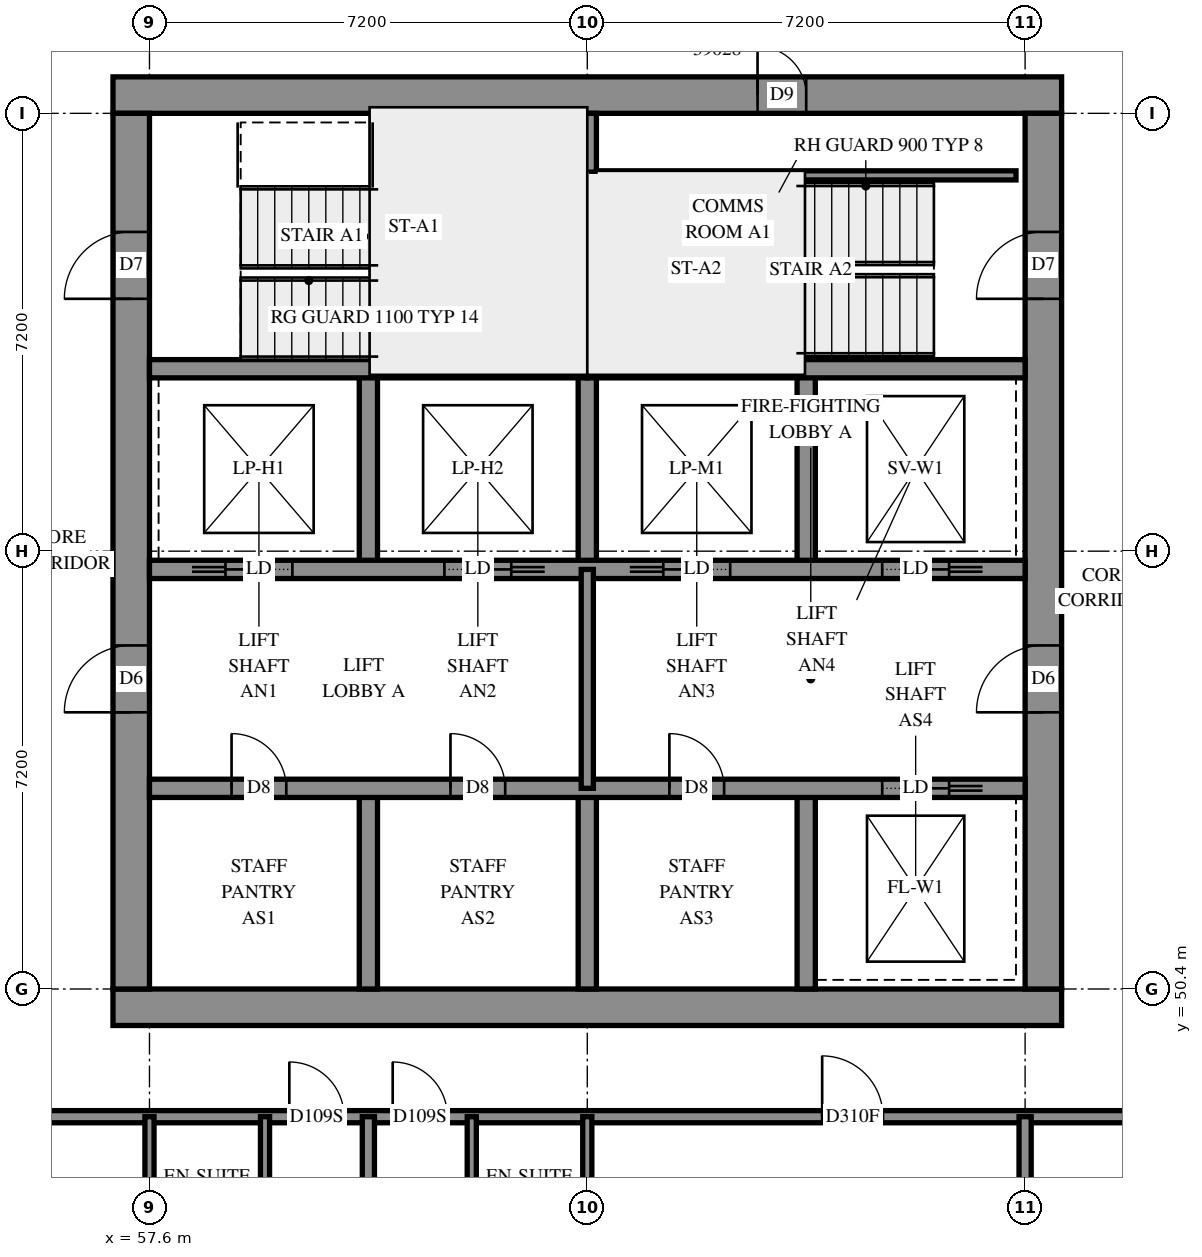
"""IFC4 building model, lengths in metres.
Left out: names, types, materials, properties, quantities, classifications, styles, units other than length and angle.
Written with IfcOpenShell. Run it as: python <this file> out.ifc"""

import sys

from ifc_helpers import new_model, si_unit, direction, frame, frame_2d, origin, place, context, subcontext, project, spatial, rectangle, extrude, element, fill, save


model = new_model("IFC4")
c1 = context("Model", 3, precision=1e-05, world=origin(), true_north=direction((0.0, 1.0)))
c2 = subcontext(c1, "Body", "Model", "MODEL_VIEW")
j1 = project(units=[si_unit("LENGTHUNIT", "METRE"), si_unit("PLANEANGLEUNIT", "RADIAN")], contexts=[c1])
p1 = place(None, origin())
s1 = spatial("IfcSite", under=j1, at=p1, CompositionType="ELEMENT")
p2 = place(p1, origin())
s2 = spatial("IfcBuilding", under=s1, at=p2, CompositionType="ELEMENT")
p3 = place(p2, frame((0.0, 0.0, 145.6)))
s3 = spatial("IfcBuildingStorey", under=s2, at=p3, CompositionType="ELEMENT", Elevation=145.6)
p4 = place(p3, frame((57.0, 50.1, -0.3), z_axis=(0.0, 0.0, 1.0), x_axis=(1.0, 0.0, 0.0)))
e1 = element("IfcWall", 1, at=p4, inside=s3, PredefinedType="SHEAR", context=c2, shape_type="SweptSolid", body=[
    extrude(rectangle(XDim=15.6, YDim=0.6, at=frame_2d((7.8, 0.0))), origin(), (0.0, 0.0, 1.0), 2.7),
])
p5 = place(p3, frame((57.0, 65.1, -0.3), z_axis=(0.0, 0.0, 1.0), x_axis=(1.0, 0.0, 0.0)))
e2 = element("IfcWall", 2, at=p5, inside=s3, PredefinedType="SHEAR", context=c2, shape_type="SweptSolid", body=[
    extrude(rectangle(XDim=15.6, YDim=0.6, at=frame_2d((7.8, 0.0))), origin(), (0.0, 0.0, 1.0), 2.7),
])
p6 = place(p5, frame((10.6, 0.0, 0.3)))
e3 = element("IfcOpeningElement", 3, at=p6, cuts=e2, PredefinedType="OPENING", context=c2, shape_type="SweptSolid", body=[
    extrude(rectangle(XDim=0.8, YDim=2.1, at=frame_2d((0.4, 1.05))), frame((0.0, 0.31, 0.0), z_axis=(0.0, -1.0, 0.0), x_axis=(1.0, 0.0, 0.0)), (0.0, 0.0, 1.0), 0.62),
])
p7 = place(p3, frame((57.3, 50.4, -0.3), z_axis=(0.0, 0.0, 1.0), x_axis=(0.0, 1.0, 0.0)))
e4 = element("IfcWall", 4, at=p7, inside=s3, PredefinedType="SHEAR", context=c2, shape_type="SweptSolid", body=[
    extrude(rectangle(XDim=14.4, YDim=0.6, at=frame_2d((7.2, 0.0))), origin(), (0.0, 0.0, 1.0), 2.7),
])
p8 = place(p7, frame((4.55, 0.0, 0.3)))
e5 = element("IfcOpeningElement", 5, at=p8, cuts=e4, PredefinedType="OPENING", context=c2, shape_type="SweptSolid", body=[
    extrude(rectangle(XDim=1.1, YDim=2.1, at=frame_2d((0.55, 1.05))), frame((0.0, 0.31, 0.0), z_axis=(0.0, -1.0, 0.0), x_axis=(1.0, 0.0, 0.0)), (0.0, 0.0, 1.0), 0.62),
])
p9 = place(p7, frame((11.35, 0.0, 0.3)))
e6 = element("IfcOpeningElement", 6, at=p9, cuts=e4, PredefinedType="OPENING", context=c2, shape_type="SweptSolid", body=[
    extrude(rectangle(XDim=1.1, YDim=2.1, at=frame_2d((0.55, 1.05))), frame((0.0, 0.31, 0.0), z_axis=(0.0, -1.0, 0.0), x_axis=(1.0, 0.0, 0.0)), (0.0, 0.0, 1.0), 0.62),
])
p10 = place(p3, frame((72.3, 50.4, -0.3), z_axis=(0.0, 0.0, 1.0), x_axis=(0.0, 1.0, 0.0)))
e7 = element("IfcWall", 7, at=p10, inside=s3, PredefinedType="SHEAR", context=c2, shape_type="SweptSolid", body=[
    extrude(rectangle(XDim=14.4, YDim=0.6, at=frame_2d((7.2, 0.0))), origin(), (0.0, 0.0, 1.0), 2.7),
])
p11 = place(p10, frame((4.55, 0.0, 0.3)))
e8 = element("IfcOpeningElement", 8, at=p11, cuts=e7, PredefinedType="OPENING", context=c2, shape_type="SweptSolid", body=[
    extrude(rectangle(XDim=1.1, YDim=2.1, at=frame_2d((0.55, 1.05))), frame((0.0, 0.31, 0.0), z_axis=(0.0, -1.0, 0.0), x_axis=(1.0, 0.0, 0.0)), (0.0, 0.0, 1.0), 0.62),
])
p12 = place(p10, frame((11.35, 0.0, 0.3)))
e9 = element("IfcOpeningElement", 9, at=p12, cuts=e7, PredefinedType="OPENING", context=c2, shape_type="SweptSolid", body=[
    extrude(rectangle(XDim=1.1, YDim=2.1, at=frame_2d((0.55, 1.05))), frame((0.0, 0.31, 0.0), z_axis=(0.0, -1.0, 0.0), x_axis=(1.0, 0.0, 0.0)), (0.0, 0.0, 1.0), 0.62),
])
for number, where, z_axis, x_axis in (
    (10, (61.2, 50.4, 0.0), (0.0, 0.0, 1.0), (0.0, 1.0, 0.0)),
    (11, (61.2, 57.3, 0.0), (0.0, 0.0, 1.0), (0.0, 1.0, 0.0)),
    (12, (64.8, 50.4, 0.0), (0.0, 0.0, 1.0), (0.0, 1.0, 0.0)),
    (13, (64.8, 57.3, 0.0), (0.0, 0.0, 1.0), (0.0, 1.0, 0.0)),
    (14, (68.4, 50.4, 0.0), (0.0, 0.0, 1.0), (0.0, 1.0, 0.0)),
    (15, (68.4, 57.3, 0.0), (0.0, 0.0, 1.0), (0.0, 1.0, 0.0)),
):
    element("IfcWall", number, at=place(p3, frame(where, z_axis=z_axis, x_axis=x_axis)), inside=s3, PredefinedType="SOLIDWALL", context=c2, shape_type="SweptSolid", body=[
        extrude(rectangle(XDim=3.3, YDim=0.3, at=frame_2d((1.65, 0.0))), origin(), (0.0, 0.0, 1.0), 3.1),
    ])
p13 = place(p3, frame((57.6, 53.7, 0.0), z_axis=(0.0, 0.0, 1.0), x_axis=(1.0, 0.0, 0.0)))
e16 = element("IfcWall", 16, at=p13, inside=s3, PredefinedType="SOLIDWALL", context=c2, shape_type="SweptSolid", body=[
    extrude(rectangle(XDim=14.4, YDim=0.3, at=frame_2d((7.2, 0.0))), origin(), (0.0, 0.0, 1.0), 3.1),
])
p14 = place(p13, frame((1.35, 0.0, 0.0)))
e17 = element("IfcOpeningElement", 17, at=p14, cuts=e16, PredefinedType="OPENING", context=c2, shape_type="SweptSolid", body=[
    extrude(rectangle(XDim=0.9, YDim=2.1, at=frame_2d((0.45, 1.05))), frame((0.0, 0.16, 0.0), z_axis=(0.0, -1.0, 0.0), x_axis=(1.0, 0.0, 0.0)), (0.0, 0.0, 1.0), 0.32),
])
p15 = place(p13, frame((4.95, 0.0, 0.0)))
e18 = element("IfcOpeningElement", 18, at=p15, cuts=e16, PredefinedType="OPENING", context=c2, shape_type="SweptSolid", body=[
    extrude(rectangle(XDim=0.9, YDim=2.1, at=frame_2d((0.45, 1.05))), frame((0.0, 0.16, 0.0), z_axis=(0.0, -1.0, 0.0), x_axis=(1.0, 0.0, 0.0)), (0.0, 0.0, 1.0), 0.32),
])
p16 = place(p13, frame((8.55, 0.0, 0.0)))
e19 = element("IfcOpeningElement", 19, at=p16, cuts=e16, PredefinedType="OPENING", context=c2, shape_type="SweptSolid", body=[
    extrude(rectangle(XDim=0.9, YDim=2.1, at=frame_2d((0.45, 1.05))), frame((0.0, 0.16, 0.0), z_axis=(0.0, -1.0, 0.0), x_axis=(1.0, 0.0, 0.0)), (0.0, 0.0, 1.0), 0.32),
])
p17 = place(p13, frame((12.05, 0.0, 0.0)))
e20 = element("IfcOpeningElement", 20, at=p17, cuts=e16, PredefinedType="OPENING", context=c2, shape_type="SweptSolid", body=[
    extrude(rectangle(XDim=1.1, YDim=2.1, at=frame_2d((0.55, 1.05))), frame((0.0, 0.16, 0.0), z_axis=(0.0, -1.0, 0.0), x_axis=(1.0, 0.0, 0.0)), (0.0, 0.0, 1.0), 0.32),
])
p18 = place(p3, frame((57.6, 57.3, 0.0), z_axis=(0.0, 0.0, 1.0), x_axis=(1.0, 0.0, 0.0)))
e21 = element("IfcWall", 21, at=p18, inside=s3, PredefinedType="SOLIDWALL", context=c2, shape_type="SweptSolid", body=[
    extrude(rectangle(XDim=14.4, YDim=0.3, at=frame_2d((7.2, 0.0))), origin(), (0.0, 0.0, 1.0), 3.1),
])
p19 = place(p18, frame((1.25, 0.0, 0.0)))
e22 = element("IfcOpeningElement", 22, at=p19, cuts=e21, PredefinedType="OPENING", context=c2, shape_type="SweptSolid", body=[
    extrude(rectangle(XDim=1.1, YDim=2.1, at=frame_2d((0.55, 1.05))), frame((0.0, 0.16, 0.0), z_axis=(0.0, -1.0, 0.0), x_axis=(1.0, 0.0, 0.0)), (0.0, 0.0, 1.0), 0.32),
])
p20 = place(p18, frame((4.85, 0.0, 0.0)))
e23 = element("IfcOpeningElement", 23, at=p20, cuts=e21, PredefinedType="OPENING", context=c2, shape_type="SweptSolid", body=[
    extrude(rectangle(XDim=1.1, YDim=2.1, at=frame_2d((0.55, 1.05))), frame((0.0, 0.16, 0.0), z_axis=(0.0, -1.0, 0.0), x_axis=(1.0, 0.0, 0.0)), (0.0, 0.0, 1.0), 0.32),
])
p21 = place(p18, frame((8.45, 0.0, 0.0)))
e24 = element("IfcOpeningElement", 24, at=p21, cuts=e21, PredefinedType="OPENING", context=c2, shape_type="SweptSolid", body=[
    extrude(rectangle(XDim=1.1, YDim=2.1, at=frame_2d((0.55, 1.05))), frame((0.0, 0.16, 0.0), z_axis=(0.0, -1.0, 0.0), x_axis=(1.0, 0.0, 0.0)), (0.0, 0.0, 1.0), 0.32),
])
p22 = place(p18, frame((12.05, 0.0, 0.0)))
e25 = element("IfcOpeningElement", 25, at=p22, cuts=e21, PredefinedType="OPENING", context=c2, shape_type="SweptSolid", body=[
    extrude(rectangle(XDim=1.1, YDim=2.1, at=frame_2d((0.55, 1.05))), frame((0.0, 0.16, 0.0), z_axis=(0.0, -1.0, 0.0), x_axis=(1.0, 0.0, 0.0)), (0.0, 0.0, 1.0), 0.32),
])
for number, where, z_axis, x_axis in (
    (26, (57.6, 60.6, 0.0), (0.0, 0.0, 1.0), (1.0, 0.0, 0.0)),
    (27, (64.8, 60.6, 0.0), (0.0, 0.0, 1.0), (1.0, 0.0, 0.0)),
):
    element("IfcWall", number, at=place(p3, frame(where, z_axis=z_axis, x_axis=x_axis)), inside=s3, PredefinedType="SOLIDWALL", context=c2, shape_type="SweptSolid", body=[
        extrude(rectangle(XDim=7.2, YDim=0.3, at=frame_2d((3.6, 0.0))), origin(), (0.0, 0.0, 1.0), 3.1),
    ])
p23 = place(p3, frame((64.8, 60.6, 0.0), z_axis=(0.0, 0.0, 1.0), x_axis=(0.0, 1.0, 0.0)))
e28 = element("IfcWall", 28, at=p23, inside=s3, PredefinedType="SOLIDWALL", context=c2, shape_type="SweptSolid", body=[
    extrude(rectangle(XDim=4.2, YDim=0.3, at=frame_2d((2.1, 0.0))), origin(), (0.0, 0.0, 1.0), 3.1),
])
p24 = place(p3, frame((64.95, 63.78, 0.0), z_axis=(0.0, 0.0, 1.0), x_axis=(1.0, 0.0, 0.0)))
e29 = element("IfcWall", 29, at=p24, inside=s3, PredefinedType="PARTITIONING", context=c2, shape_type="SweptSolid", body=[
    extrude(rectangle(XDim=6.9, YDim=0.15, at=frame_2d((3.45, 0.0))), origin(), (0.0, 0.0, 1.0), 3.1),
])
p25 = place(p3, frame((64.8, 53.7, 0.0), z_axis=(0.0, 0.0, 1.0), x_axis=(0.0, 1.0, 0.0)))
e30 = element("IfcWall", 30, at=p25, inside=s3, PredefinedType="PARTITIONING", context=c2, shape_type="SweptSolid", body=[
    extrude(rectangle(XDim=3.6, YDim=0.2, at=frame_2d((1.8, 0.0))), origin(), (0.0, 0.0, 1.0), 3.1),
])
p26 = place(p3, frame((55.5, 48.3, 0.0), z_axis=(0.0, 0.0, 1.0), x_axis=(1.0, 0.0, 0.0)))
e31 = element("IfcWall", 31, at=p26, inside=s3, PredefinedType="PARTITIONING", context=c2, shape_type="SweptSolid", body=[
    extrude(rectangle(XDim=18.974, YDim=0.2, at=frame_2d((9.487, 0.0))), origin(), (0.0, 0.0, 1.0), 3.1),
])
p27 = place(p26, frame((4.4, 0.0, 0.0)))
e32 = element("IfcOpeningElement", 32, at=p27, cuts=e31, PredefinedType="OPENING", context=c2, shape_type="SweptSolid", body=[
    extrude(rectangle(XDim=0.9, YDim=2.1, at=frame_2d((0.45, 1.05))), frame((0.0, 0.11, 0.0), z_axis=(0.0, -1.0, 0.0), x_axis=(1.0, 0.0, 0.0)), (0.0, 0.0, 1.0), 0.22),
])
p28 = place(p26, frame((6.1, 0.0, 0.0)))
e33 = element("IfcOpeningElement", 33, at=p28, cuts=e31, PredefinedType="OPENING", context=c2, shape_type="SweptSolid", body=[
    extrude(rectangle(XDim=0.9, YDim=2.1, at=frame_2d((0.45, 1.05))), frame((0.0, 0.11, 0.0), z_axis=(0.0, -1.0, 0.0), x_axis=(1.0, 0.0, 0.0)), (0.0, 0.0, 1.0), 0.22),
])
p29 = place(p26, frame((13.162, 0.0, 0.0)))
e34 = element("IfcOpeningElement", 34, at=p29, cuts=e31, PredefinedType="OPENING", context=c2, shape_type="SweptSolid", body=[
    extrude(rectangle(XDim=1.0, YDim=2.1, at=frame_2d((0.5, 1.05))), frame((0.0, 0.11, 0.0), z_axis=(0.0, -1.0, 0.0), x_axis=(1.0, 0.0, 0.0)), (0.0, 0.0, 1.0), 0.22),
])
p30 = place(p3, frame((61.2, 42.304, 0.0), z_axis=(0.0, 0.0, 1.0), x_axis=(0.0, 1.0, 0.0)))
e35 = element("IfcWall", 35, at=p30, inside=s3, PredefinedType="PARTITIONING", context=c2, shape_type="SweptSolid", body=[
    extrude(rectangle(XDim=5.996, YDim=0.2, at=frame_2d((2.998, 0.0))), origin(), (0.0, 0.0, 1.0), 3.1),
])
p31 = place(p3, frame((72.0, 43.65, 0.0), z_axis=(0.0, 0.0, 1.0), x_axis=(0.0, 1.0, 0.0)))
e36 = element("IfcWall", 36, at=p31, inside=s3, PredefinedType="PARTITIONING", context=c2, shape_type="SweptSolid", body=[
    extrude(rectangle(XDim=4.65, YDim=0.2, at=frame_2d((2.325, 0.0))), origin(), (0.0, 0.0, 1.0), 3.1),
])
for number, where, z_axis, x_axis in (
    (37, (59.5, 45.9, 0.0), (0.0, 0.0, 1.0), (0.0, 1.0, 0.0)),
    (38, (57.6, 45.9, 0.0), (0.0, 0.0, 1.0), (0.0, 1.0, 0.0)),
    (39, (62.9, 45.9, 0.0), (0.0, 0.0, 1.0), (0.0, 1.0, 0.0)),
    (40, (64.8, 45.9, 0.0), (0.0, 0.0, 1.0), (0.0, 1.0, 0.0)),
):
    element("IfcWall", number, at=place(p3, frame(where, z_axis=z_axis, x_axis=x_axis)), inside=s3, PredefinedType="PARTITIONING", context=c2, shape_type="SweptSolid", body=[
        extrude(rectangle(XDim=2.4, YDim=0.15, at=frame_2d((1.2, 0.0))), origin(), (0.0, 0.0, 1.0), 3.1),
    ])
p32 = place(p6, origin())
e41 = element("IfcDoor", 41, at=p32, inside=s3, OperationType="SINGLE_SWING_RIGHT", PredefinedType="DOOR", context=c2, shape_type="SweptSolid", body=[
    extrude(rectangle(XDim=0.8, YDim=2.1, at=frame_2d((0.4, 1.05))), frame((0.0, 0.025, 0.0), z_axis=(0.0, -1.0, 0.0), x_axis=(1.0, 0.0, 0.0)), (0.0, 0.0, 1.0), 0.05),
])
fill(e3, e41)
p33 = place(p8, origin())
e42 = element("IfcDoor", 42, at=p33, inside=s3, OperationType="DOUBLE_DOOR_SINGLE_SWING", PredefinedType="DOOR", context=c2, shape_type="SweptSolid", body=[
    extrude(rectangle(XDim=1.1, YDim=2.1, at=frame_2d((0.55, 1.05))), frame((0.0, 0.025, 0.0), z_axis=(0.0, -1.0, 0.0), x_axis=(1.0, 0.0, 0.0)), (0.0, 0.0, 1.0), 0.05),
])
fill(e5, e42)
p34 = place(p11, origin())
e43 = element("IfcDoor", 43, at=p34, inside=s3, OperationType="DOUBLE_DOOR_SINGLE_SWING", PredefinedType="DOOR", context=c2, shape_type="SweptSolid", body=[
    extrude(rectangle(XDim=1.1, YDim=2.1, at=frame_2d((0.55, 1.05))), frame((0.0, 0.025, 0.0), z_axis=(0.0, -1.0, 0.0), x_axis=(1.0, 0.0, 0.0)), (0.0, 0.0, 1.0), 0.05),
])
fill(e8, e43)
p35 = place(p9, origin())
e44 = element("IfcDoor", 44, at=p35, inside=s3, OperationType="SINGLE_SWING_LEFT", PredefinedType="DOOR", context=c2, shape_type="SweptSolid", body=[
    extrude(rectangle(XDim=1.1, YDim=2.1, at=frame_2d((0.55, 1.05))), frame((0.0, 0.025, 0.0), z_axis=(0.0, -1.0, 0.0), x_axis=(1.0, 0.0, 0.0)), (0.0, 0.0, 1.0), 0.05),
])
fill(e6, e44)
p36 = place(p12, origin())
e45 = element("IfcDoor", 45, at=p36, inside=s3, OperationType="SINGLE_SWING_RIGHT", PredefinedType="DOOR", context=c2, shape_type="SweptSolid", body=[
    extrude(rectangle(XDim=1.1, YDim=2.1, at=frame_2d((0.55, 1.05))), frame((0.0, 0.025, 0.0), z_axis=(0.0, -1.0, 0.0), x_axis=(1.0, 0.0, 0.0)), (0.0, 0.0, 1.0), 0.05),
])
fill(e9, e45)
p37 = place(p14, origin())
e46 = element("IfcDoor", 46, at=p37, inside=s3, OperationType="SINGLE_SWING_LEFT", PredefinedType="DOOR", context=c2, shape_type="SweptSolid", body=[
    extrude(rectangle(XDim=0.9, YDim=2.1, at=frame_2d((0.45, 1.05))), frame((0.0, 0.025, 0.0), z_axis=(0.0, -1.0, 0.0), x_axis=(1.0, 0.0, 0.0)), (0.0, 0.0, 1.0), 0.05),
])
fill(e17, e46)
p38 = place(p15, origin())
e47 = element("IfcDoor", 47, at=p38, inside=s3, OperationType="SINGLE_SWING_LEFT", PredefinedType="DOOR", context=c2, shape_type="SweptSolid", body=[
    extrude(rectangle(XDim=0.9, YDim=2.1, at=frame_2d((0.45, 1.05))), frame((0.0, 0.025, 0.0), z_axis=(0.0, -1.0, 0.0), x_axis=(1.0, 0.0, 0.0)), (0.0, 0.0, 1.0), 0.05),
])
fill(e18, e47)
p39 = place(p16, origin())
e48 = element("IfcDoor", 48, at=p39, inside=s3, OperationType="SINGLE_SWING_LEFT", PredefinedType="DOOR", context=c2, shape_type="SweptSolid", body=[
    extrude(rectangle(XDim=0.9, YDim=2.1, at=frame_2d((0.45, 1.05))), frame((0.0, 0.025, 0.0), z_axis=(0.0, -1.0, 0.0), x_axis=(1.0, 0.0, 0.0)), (0.0, 0.0, 1.0), 0.05),
])
fill(e19, e48)
p40 = place(p17, origin())
e49 = element("IfcDoor", 49, at=p40, inside=s3, OperationType="SLIDING_TO_RIGHT", PredefinedType="DOOR", context=c2, shape_type="SweptSolid", body=[
    extrude(rectangle(XDim=1.1, YDim=2.1, at=frame_2d((0.55, 1.05))), frame((0.0, 0.025, 0.0), z_axis=(0.0, -1.0, 0.0), x_axis=(1.0, 0.0, 0.0)), (0.0, 0.0, 1.0), 0.05),
])
fill(e20, e49)
p41 = place(p19, origin())
e50 = element("IfcDoor", 50, at=p41, inside=s3, OperationType="SLIDING_TO_LEFT", PredefinedType="DOOR", context=c2, shape_type="SweptSolid", body=[
    extrude(rectangle(XDim=1.1, YDim=2.1, at=frame_2d((0.55, 1.05))), frame((0.0, 0.025, 0.0), z_axis=(0.0, -1.0, 0.0), x_axis=(1.0, 0.0, 0.0)), (0.0, 0.0, 1.0), 0.05),
])
fill(e22, e50)
p42 = place(p20, origin())
e51 = element("IfcDoor", 51, at=p42, inside=s3, OperationType="SLIDING_TO_RIGHT", PredefinedType="DOOR", context=c2, shape_type="SweptSolid", body=[
    extrude(rectangle(XDim=1.1, YDim=2.1, at=frame_2d((0.55, 1.05))), frame((0.0, 0.025, 0.0), z_axis=(0.0, -1.0, 0.0), x_axis=(1.0, 0.0, 0.0)), (0.0, 0.0, 1.0), 0.05),
])
fill(e23, e51)
p43 = place(p21, origin())
e52 = element("IfcDoor", 52, at=p43, inside=s3, OperationType="SLIDING_TO_LEFT", PredefinedType="DOOR", context=c2, shape_type="SweptSolid", body=[
    extrude(rectangle(XDim=1.1, YDim=2.1, at=frame_2d((0.55, 1.05))), frame((0.0, 0.025, 0.0), z_axis=(0.0, -1.0, 0.0), x_axis=(1.0, 0.0, 0.0)), (0.0, 0.0, 1.0), 0.05),
])
fill(e24, e52)
p44 = place(p22, origin())
e53 = element("IfcDoor", 53, at=p44, inside=s3, OperationType="SLIDING_TO_RIGHT", PredefinedType="DOOR", context=c2, shape_type="SweptSolid", body=[
    extrude(rectangle(XDim=1.1, YDim=2.1, at=frame_2d((0.55, 1.05))), frame((0.0, 0.025, 0.0), z_axis=(0.0, -1.0, 0.0), x_axis=(1.0, 0.0, 0.0)), (0.0, 0.0, 1.0), 0.05),
])
fill(e25, e53)
p45 = place(p27, origin())
e54 = element("IfcDoor", 54, at=p45, inside=s3, OperationType="SINGLE_SWING_LEFT", PredefinedType="DOOR", context=c2, shape_type="SweptSolid", body=[
    extrude(rectangle(XDim=0.9, YDim=2.1, at=frame_2d((0.45, 1.05))), frame((0.0, 0.025, 0.0), z_axis=(0.0, -1.0, 0.0), x_axis=(1.0, 0.0, 0.0)), (0.0, 0.0, 1.0), 0.05),
])
fill(e32, e54)
p46 = place(p28, origin())
e55 = element("IfcDoor", 55, at=p46, inside=s3, OperationType="SINGLE_SWING_RIGHT", PredefinedType="DOOR", context=c2, shape_type="SweptSolid", body=[
    extrude(rectangle(XDim=0.9, YDim=2.1, at=frame_2d((0.45, 1.05))), frame((0.0, 0.025, 0.0), z_axis=(0.0, -1.0, 0.0), x_axis=(1.0, 0.0, 0.0)), (0.0, 0.0, 1.0), 0.05),
])
fill(e33, e55)
p47 = place(p29, origin())
e56 = element("IfcDoor", 56, at=p47, inside=s3, OperationType="SINGLE_SWING_LEFT", PredefinedType="DOOR", context=c2, shape_type="SweptSolid", body=[
    extrude(rectangle(XDim=1.0, YDim=2.1, at=frame_2d((0.5, 1.05))), frame((0.0, 0.025, 0.0), z_axis=(0.0, -1.0, 0.0), x_axis=(1.0, 0.0, 0.0)), (0.0, 0.0, 1.0), 0.05),
])
fill(e34, e56)
save(model, sys.argv[1])
